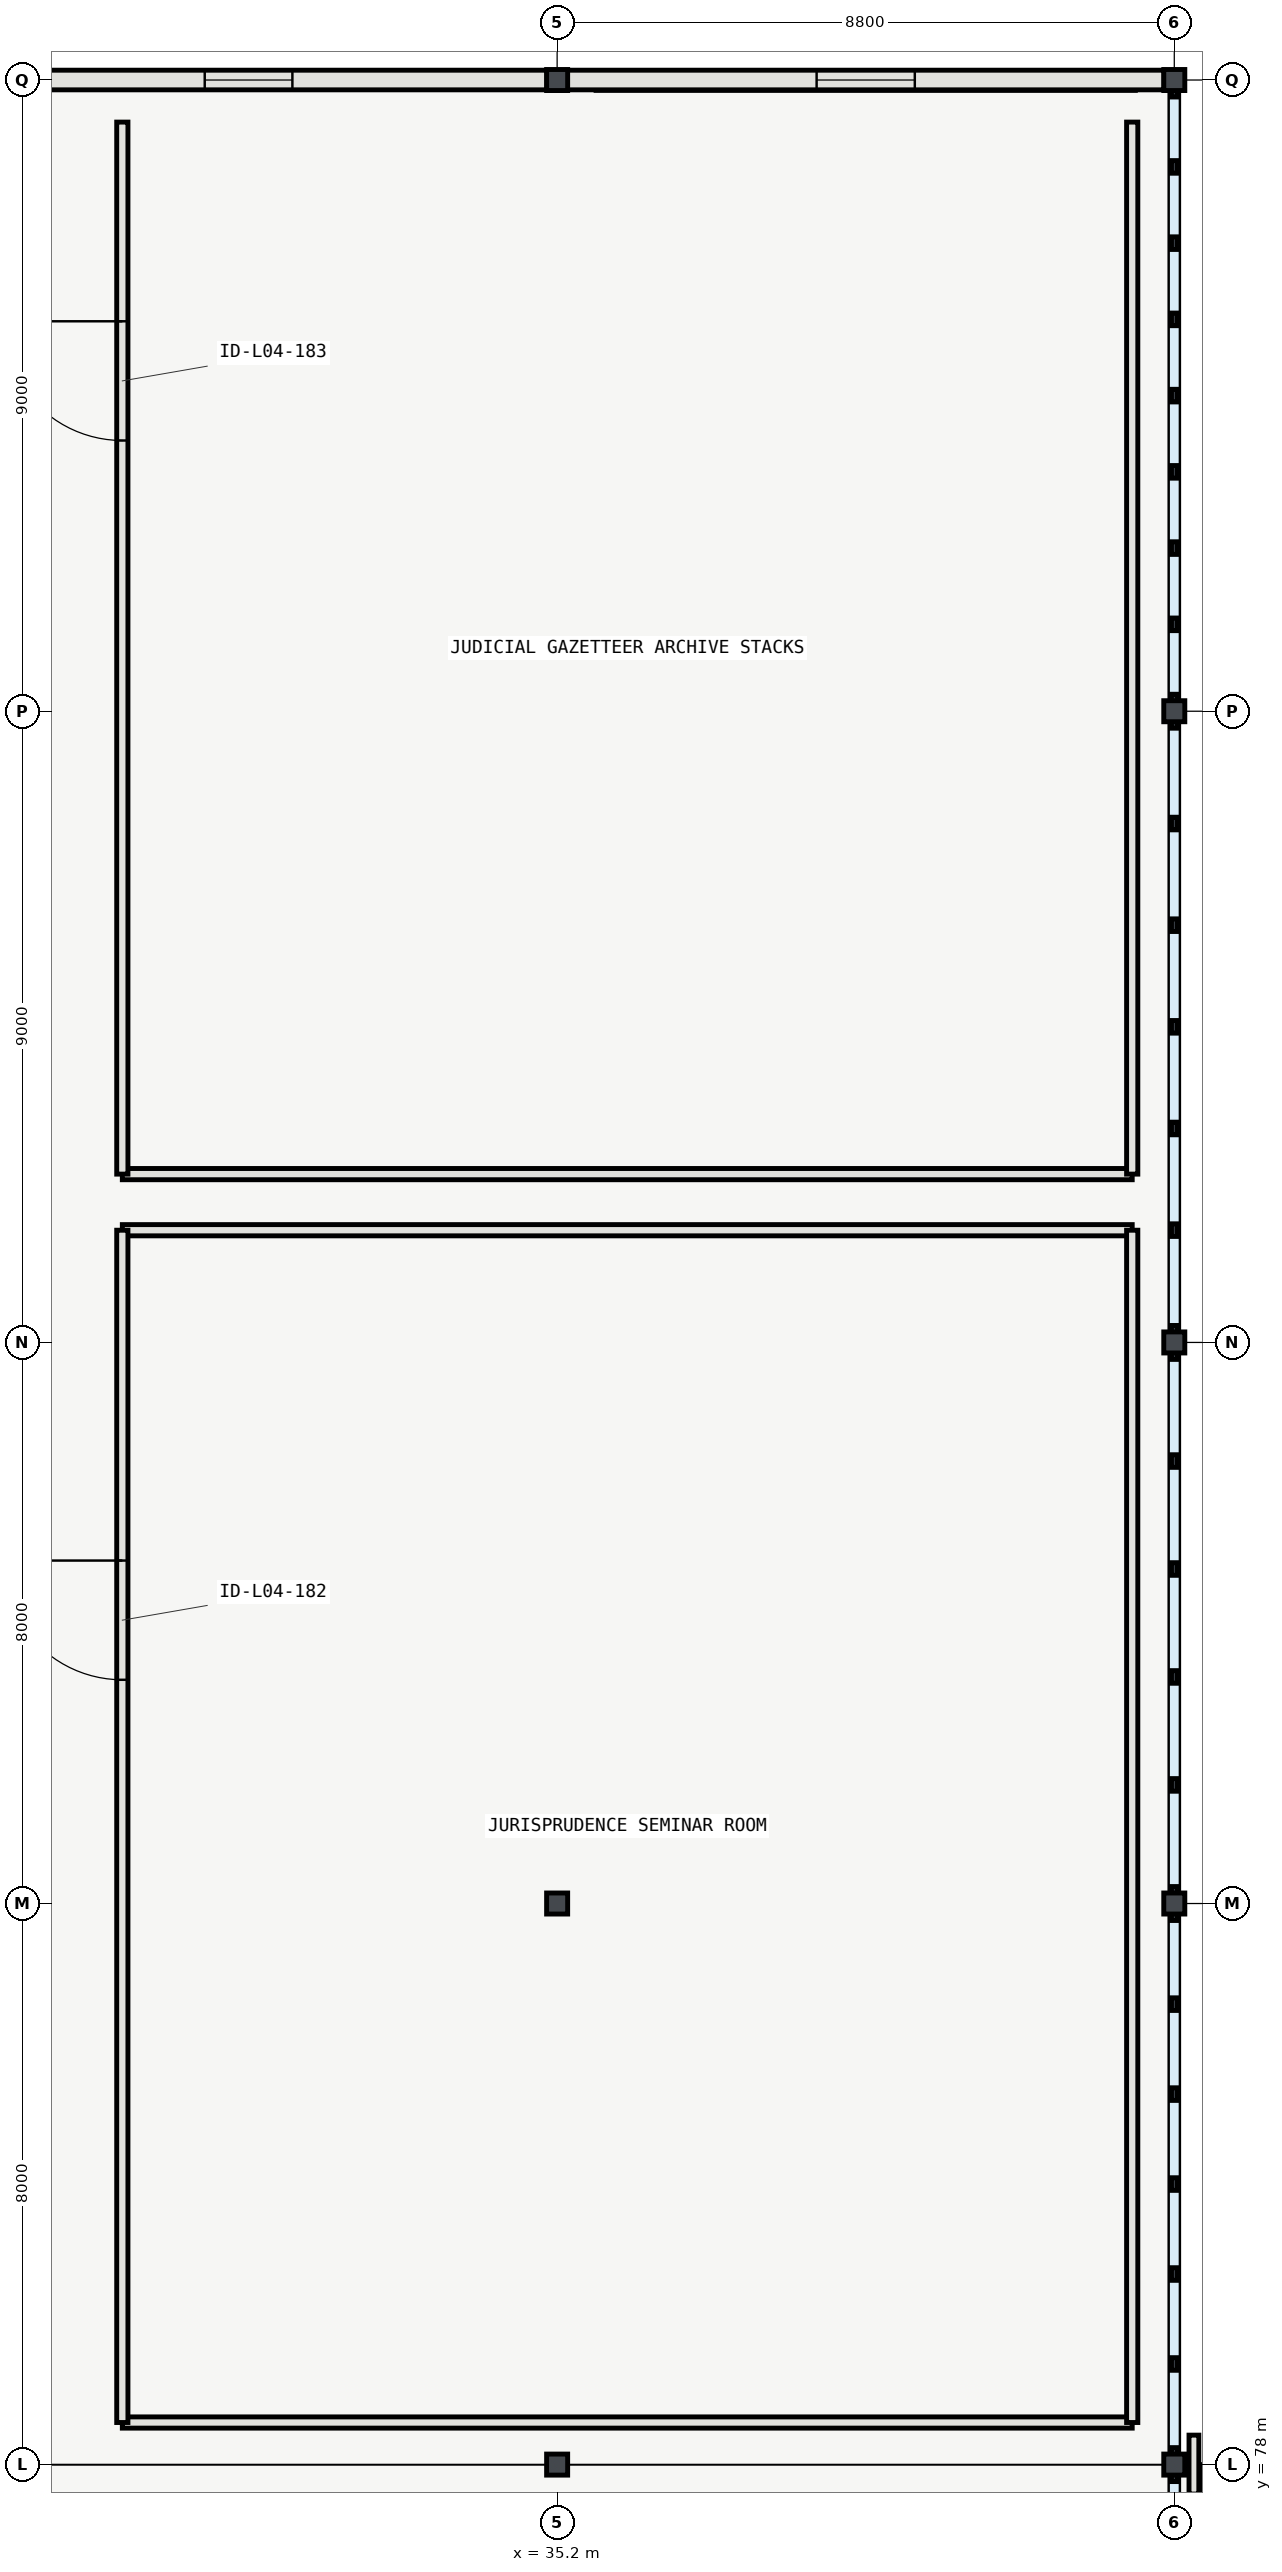
"""IFC4 building model, lengths in metres.
Left out: names, types, materials, properties, quantities, classifications, styles, units other than length and angle.
Written with IfcOpenShell. Run it as: python <this file> out.ifc"""

import sys

from ifc_helpers import new_model, si_unit, direction, frame, frame_2d, origin, origin_2d, place, context, subcontext, project, spatial, rectangle, i_section, extrude, element, fill, save


model = new_model("IFC4")
c1 = context("Model", 3, precision=1e-05, world=origin(), true_north=direction((0.0, 1.0)))
c2 = subcontext(c1, "Body", "Model", "MODEL_VIEW")
j1 = project(units=[si_unit("LENGTHUNIT", "METRE"), si_unit("PLANEANGLEUNIT", "RADIAN")], contexts=[c1])
p1 = place(None, origin())
s1 = spatial("IfcSite", under=j1, at=p1, CompositionType="ELEMENT")
p2 = place(p1, origin())
s2 = spatial("IfcBuilding", under=s1, at=p2, CompositionType="ELEMENT")
p3 = place(p2, frame((0.0, 0.0, 20.4)))
s3 = spatial("IfcBuildingStorey", under=s2, at=p3, CompositionType="ELEMENT", Elevation=20.4)
for number, where, z_axis, x_axis in (
    (1, (35.2, 78.0, 0.0), (0.0, 0.0, 1.0), (1.0, 0.0, 0.0)),
    (2, (35.2, 86.0, 0.0), (0.0, 0.0, 1.0), (1.0, 0.0, 0.0)),
    (3, (35.2, 112.0, 0.0), (0.0, 0.0, 1.0), (1.0, 0.0, 0.0)),
    (4, (44.0, 78.0, 0.0), (0.0, 0.0, 1.0), (1.0, 0.0, 0.0)),
    (5, (44.0, 86.0, 0.0), (0.0, 0.0, 1.0), (1.0, 0.0, 0.0)),
    (6, (44.0, 94.0, 0.0), (0.0, 0.0, 1.0), (1.0, 0.0, 0.0)),
    (7, (44.0, 103.0, 0.0), (0.0, 0.0, 1.0), (1.0, 0.0, 0.0)),
    (8, (44.0, 112.0, 0.0), (0.0, 0.0, 1.0), (1.0, 0.0, 0.0)),
):
    element("IfcColumn", number, at=place(p3, frame(where, z_axis=z_axis, x_axis=x_axis)), inside=s3, PredefinedType="COLUMN", context=c2, shape_type="SweptSolid", body=[
        extrude(i_section(OverallWidth=0.3, OverallDepth=0.3, WebThickness=0.01, FlangeThickness=0.015, FilletRadius=0.018, at=origin_2d()), origin(), (0.0, 0.0, 1.0), 4.2),
    ])
p4 = place(p3, frame((35.054, 112.0, 0.0), z_axis=(0.0, 0.0, 1.0), x_axis=(-1.0, 0.0, 0.0)))
e9 = element("IfcWall", 9, at=p4, inside=s3, PredefinedType="SOLIDWALL", context=c2, shape_type="SweptSolid", body=[
    extrude(rectangle(XDim=8.508, YDim=0.28, at=frame_2d((4.254, 0.0))), origin(), (0.0, 0.0, 1.0), 3.423),
])
p5 = place(p4, frame((3.629, 0.0, 0.95)))
e10 = element("IfcOpeningElement", 10, at=p5, cuts=e9, PredefinedType="OPENING", context=c2, shape_type="SweptSolid", body=[
    extrude(rectangle(XDim=1.25, YDim=1.6, at=frame_2d((0.625, 0.8))), frame((0.0, 0.15, 0.0), z_axis=(0.0, -1.0, 0.0), x_axis=(1.0, 0.0, 0.0)), (0.0, 0.0, 1.0), 0.3),
])
p6 = place(p3, frame((43.854, 112.0, 0.0), z_axis=(0.0, 0.0, 1.0), x_axis=(-1.0, 0.0, 0.0)))
e11 = element("IfcWall", 11, at=p6, inside=s3, PredefinedType="SOLIDWALL", context=c2, shape_type="SweptSolid", body=[
    extrude(rectangle(XDim=8.508, YDim=0.28, at=frame_2d((4.254, 0.0))), origin(), (0.0, 0.0, 1.0), 3.423),
])
p7 = place(p6, frame((3.554, 0.0, 0.95)))
e12 = element("IfcOpeningElement", 12, at=p7, cuts=e11, PredefinedType="OPENING", context=c2, shape_type="SweptSolid", body=[
    extrude(rectangle(XDim=1.4, YDim=1.6, at=frame_2d((0.7, 0.8))), frame((0.0, 0.15, 0.0), z_axis=(0.0, -1.0, 0.0), x_axis=(1.0, 0.0, 0.0)), (0.0, 0.0, 1.0), 0.3),
])
p8 = place(p3, frame((44.44, 30.0, 0.0), z_axis=(0.0, 0.0, 1.0), x_axis=(0.0, 1.0, 0.0)))
e13 = element("IfcWall", 13, at=p8, inside=s3, PredefinedType="SOLIDWALL", context=c2, shape_type="SweptSolid", body=[
    extrude(rectangle(XDim=48.0, YDim=0.16, at=frame_2d((24.0, 0.0))), origin(), (0.0, 0.0, 1.0), 0.58),
])
p9 = place(p3, frame((44.28, 77.58, 0.0), z_axis=(0.0, 0.0, 1.0), x_axis=(0.0, 1.0, 0.0)))
e14 = element("IfcWall", 14, at=p9, inside=s3, PredefinedType="SOLIDWALL", context=c2, shape_type="SweptSolid", body=[
    extrude(rectangle(XDim=0.84, YDim=0.14, at=frame_2d((0.42, 0.0))), origin(), (0.0, 0.0, 1.0), 3.94),
])
for number, where, z_axis, x_axis in (
    (15, (29.0, 78.6, 0.0), (0.0, 0.0, 1.0), (1.0, 0.0, 0.0)),
    (16, (43.4, 95.6, 0.0), (0.0, 0.0, 1.0), (-1.0, 0.0, 0.0)),
):
    element("IfcWall", number, at=place(p3, frame(where, z_axis=z_axis, x_axis=x_axis)), inside=s3, PredefinedType="PARTITIONING", context=c2, shape_type="SweptSolid", body=[
        extrude(rectangle(XDim=14.4, YDim=0.16, at=frame_2d((7.2, 0.0))), origin(), (0.0, 0.0, 1.0), 3.92),
    ])
p10 = place(p3, frame((29.0, 95.6, 0.0), z_axis=(0.0, 0.0, 1.0), x_axis=(0.0, -1.0, 0.0)))
e17 = element("IfcWall", 17, at=p10, inside=s3, PredefinedType="PARTITIONING", context=c2, shape_type="SweptSolid", body=[
    extrude(rectangle(XDim=17.0, YDim=0.16, at=frame_2d((8.5, 0.0))), origin(), (0.0, 0.0, 1.0), 3.92),
])
p11 = place(p10, frame((4.71, 0.0, 0.0)))
e18 = element("IfcOpeningElement", 18, at=p11, cuts=e17, PredefinedType="OPENING", context=c2, shape_type="SweptSolid", body=[
    extrude(rectangle(XDim=1.7, YDim=2.3, at=frame_2d((0.85, 1.15))), frame((0.0, 0.09, 0.0), z_axis=(0.0, -1.0, 0.0), x_axis=(1.0, 0.0, 0.0)), (0.0, 0.0, 1.0), 0.18),
])
p12 = place(p3, frame((43.4, 78.6, 0.0), z_axis=(0.0, 0.0, 1.0), x_axis=(0.0, 1.0, 0.0)))
e19 = element("IfcWall", 19, at=p12, inside=s3, PredefinedType="PARTITIONING", context=c2, shape_type="SweptSolid", body=[
    extrude(rectangle(XDim=17.0, YDim=0.16, at=frame_2d((8.5, 0.0))), origin(), (0.0, 0.0, 1.0), 3.92),
])
p13 = place(p3, frame((29.0, 96.4, 0.0), z_axis=(0.0, 0.0, 1.0), x_axis=(1.0, 0.0, 0.0)))
e20 = element("IfcWall", 20, at=p13, inside=s3, PredefinedType="PARTITIONING", context=c2, shape_type="SweptSolid", body=[
    extrude(rectangle(XDim=14.4, YDim=0.16, at=frame_2d((7.2, 0.0))), origin(), (0.0, 0.0, 1.0), 3.92),
])
p14 = place(p3, frame((29.0, 111.4, 0.0), z_axis=(0.0, 0.0, 1.0), x_axis=(0.0, -1.0, 0.0)))
e21 = element("IfcWall", 21, at=p14, inside=s3, PredefinedType="PARTITIONING", context=c2, shape_type="SweptSolid", body=[
    extrude(rectangle(XDim=15.0, YDim=0.16, at=frame_2d((7.5, 0.0))), origin(), (0.0, 0.0, 1.0), 3.92),
])
p15 = place(p14, frame((2.84, 0.0, 0.0)))
e22 = element("IfcOpeningElement", 22, at=p15, cuts=e21, PredefinedType="OPENING", context=c2, shape_type="SweptSolid", body=[
    extrude(rectangle(XDim=1.7, YDim=2.3, at=frame_2d((0.85, 1.15))), frame((0.0, 0.09, 0.0), z_axis=(0.0, -1.0, 0.0), x_axis=(1.0, 0.0, 0.0)), (0.0, 0.0, 1.0), 0.18),
])
p16 = place(p3, frame((43.4, 96.4, 0.0), z_axis=(0.0, 0.0, 1.0), x_axis=(0.0, 1.0, 0.0)))
e23 = element("IfcWall", 23, at=p16, inside=s3, PredefinedType="PARTITIONING", context=c2, shape_type="SweptSolid", body=[
    extrude(rectangle(XDim=15.0, YDim=0.16, at=frame_2d((7.5, 0.0))), origin(), (0.0, 0.0, 1.0), 3.92),
])
p17 = place(p5, origin())
e24 = element("IfcWindow", 24, at=p17, inside=s3, PartitioningType="SINGLE_PANEL", PredefinedType="WINDOW", context=c2, shape_type="SweptSolid", body=[
    extrude(rectangle(XDim=1.25, YDim=1.6, at=frame_2d((0.625, 0.8))), frame((0.0, 0.03, 0.0), z_axis=(0.0, -1.0, 0.0), x_axis=(1.0, 0.0, 0.0)), (0.0, 0.0, 1.0), 0.06),
])
fill(e10, e24)
p18 = place(p7, origin())
e25 = element("IfcWindow", 25, at=p18, inside=s3, PartitioningType="SINGLE_PANEL", PredefinedType="WINDOW", context=c2, shape_type="SweptSolid", body=[
    extrude(rectangle(XDim=1.4, YDim=1.6, at=frame_2d((0.7, 0.8))), frame((0.0, 0.03, 0.0), z_axis=(0.0, -1.0, 0.0), x_axis=(1.0, 0.0, 0.0)), (0.0, 0.0, 1.0), 0.06),
])
fill(e12, e25)
p19 = place(p11, origin())
e26 = element("IfcDoor", 26, at=p19, inside=s3, OperationType="DOUBLE_DOOR_SINGLE_SWING", PredefinedType="DOOR", context=c2, shape_type="SweptSolid", body=[
    extrude(rectangle(XDim=1.7, YDim=2.3, at=frame_2d((0.85, 1.15))), frame((0.0, 0.025, 0.0), z_axis=(0.0, -1.0, 0.0), x_axis=(1.0, 0.0, 0.0)), (0.0, 0.0, 1.0), 0.05),
])
fill(e18, e26)
p20 = place(p15, origin())
e27 = element("IfcDoor", 27, at=p20, inside=s3, OperationType="DOUBLE_DOOR_SINGLE_SWING", PredefinedType="DOOR", context=c2, shape_type="SweptSolid", body=[
    extrude(rectangle(XDim=1.7, YDim=2.3, at=frame_2d((0.85, 1.15))), frame((0.0, 0.025, 0.0), z_axis=(0.0, -1.0, 0.0), x_axis=(1.0, 0.0, 0.0)), (0.0, 0.0, 1.0), 0.05),
])
fill(e22, e27)
save(model, sys.argv[1])
